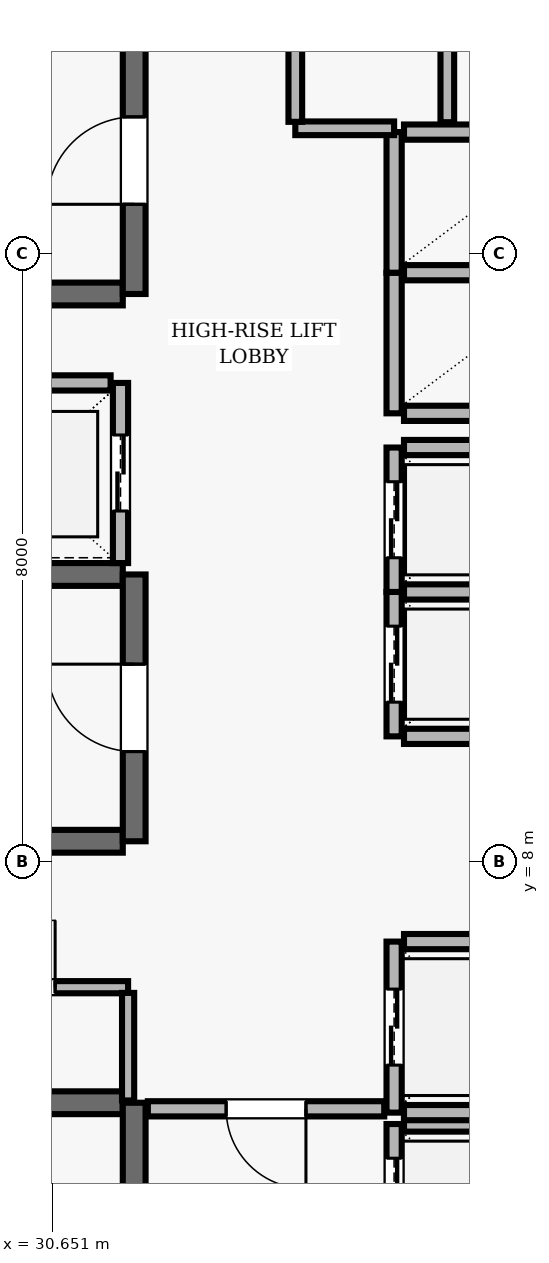
"""IFC4 building model, lengths in metres.
Left out: names, types, materials, properties, quantities, classifications, styles, units other than length and angle.
Written with IfcOpenShell. Run it as: python <this file> out.ifc"""

import sys

from ifc_helpers import new_model, si_unit, direction, frame, frame_2d, origin, place, context, subcontext, project, spatial, rectangle, extrude, element, fill, save


model = new_model("IFC4")
c1 = context("Model", 3, precision=1e-05, world=origin(), true_north=direction((0.0, 1.0)))
c2 = subcontext(c1, "Body", "Model", "MODEL_VIEW")
j1 = project(units=[si_unit("LENGTHUNIT", "METRE"), si_unit("PLANEANGLEUNIT", "RADIAN")], contexts=[c1])
p1 = place(None, origin())
s1 = spatial("IfcSite", under=j1, at=p1, CompositionType="ELEMENT")
p2 = place(p1, origin())
s2 = spatial("IfcBuilding", under=s1, at=p2, CompositionType="ELEMENT")
p3 = place(p2, frame((0.0, 0.0, 295.0)))
s3 = spatial("IfcBuildingStorey", under=s2, at=p3, CompositionType="ELEMENT", Elevation=295.0)
p4 = place(p3, frame((31.58, 4.83, 0.0), z_axis=(0.0, 0.0, 1.0), x_axis=(-1.0, 0.0, 0.0)))
e1 = element("IfcWall", 1, at=p4, inside=s3, PredefinedType="SHEAR", context=c2, shape_type="SweptSolid", body=[
    extrude(rectangle(XDim=8.36, YDim=0.3, at=frame_2d((4.18, 0.0))), origin(), (0.0, 0.0, 1.0), 3.69),
])
p5 = place(p3, frame((31.73, 0.96, 0.0), z_axis=(0.0, 0.0, 1.0), x_axis=(0.0, 1.0, 0.0)))
e2 = element("IfcWall", 2, at=p5, inside=s3, PredefinedType="SHEAR", context=c2, shape_type="SweptSolid", body=[
    extrude(rectangle(XDim=3.87, YDim=0.3, at=frame_2d((1.935, 0.0))), origin(), (0.0, 0.0, 1.0), 3.69),
])
p6 = place(p5, frame((1.54, 0.0, 0.0)))
e3 = element("IfcOpeningElement", 3, at=p6, cuts=e2, PredefinedType="OPENING", context=c2, shape_type="SweptSolid", body=[
    extrude(rectangle(XDim=1.15, YDim=2.15, at=frame_2d((0.575, 1.075))), frame((0.0, 0.16, 0.0), z_axis=(0.0, -1.0, 0.0), x_axis=(1.0, 0.0, 0.0)), (0.0, 0.0, 1.0), 0.32),
])
p7 = place(p3, frame((23.22, 15.47, 0.0), z_axis=(0.0, 0.0, 1.0), x_axis=(1.0, 0.0, 0.0)))
e4 = element("IfcWall", 4, at=p7, inside=s3, PredefinedType="SHEAR", context=c2, shape_type="SweptSolid", body=[
    extrude(rectangle(XDim=8.36, YDim=0.3, at=frame_2d((4.18, 0.0))), origin(), (0.0, 0.0, 1.0), 3.69),
])
p8 = place(p3, frame((31.73, 15.47, 0.0), z_axis=(0.0, 0.0, 1.0), x_axis=(0.0, 1.0, 0.0)))
e5 = element("IfcWall", 5, at=p8, inside=s3, PredefinedType="SHEAR", context=c2, shape_type="SweptSolid", body=[
    extrude(rectangle(XDim=3.51, YDim=0.3, at=frame_2d((1.755, 0.0))), origin(), (0.0, 0.0, 1.0), 3.69),
])
p9 = place(p8, frame((1.18, 0.0, 0.0)))
e6 = element("IfcOpeningElement", 6, at=p9, cuts=e5, PredefinedType="OPENING", context=c2, shape_type="SweptSolid", body=[
    extrude(rectangle(XDim=1.15, YDim=2.15, at=frame_2d((0.575, 1.075))), frame((0.0, 0.16, 0.0), z_axis=(0.0, -1.0, 0.0), x_axis=(1.0, 0.0, 0.0)), (0.0, 0.0, 1.0), 0.32),
])
for number, where, z_axis, x_axis in (
    (7, (31.58, 11.78, 0.0), (0.0, 0.0, 1.0), (-1.0, 0.0, 0.0)),
    (8, (23.22, 8.27, 0.0), (0.0, 0.0, 1.0), (1.0, 0.0, 0.0)),
):
    element("IfcWall", number, at=place(p3, frame(where, z_axis=z_axis, x_axis=x_axis)), inside=s3, PredefinedType="SHEAR", context=c2, shape_type="SweptSolid", body=[
        extrude(rectangle(XDim=8.36, YDim=0.3, at=frame_2d((4.18, 0.0))), origin(), (0.0, 0.0, 1.0), 3.69),
    ])
p10 = place(p3, frame((31.73, 8.27, 0.0), z_axis=(0.0, 0.0, 1.0), x_axis=(0.0, 1.0, 0.0)))
e9 = element("IfcWall", 9, at=p10, inside=s3, PredefinedType="SHEAR", context=c2, shape_type="SweptSolid", body=[
    extrude(rectangle(XDim=3.51, YDim=0.3, at=frame_2d((1.755, 0.0))), origin(), (0.0, 0.0, 1.0), 3.69),
])
p11 = place(p10, frame((1.18, 0.0, 0.0)))
e10 = element("IfcOpeningElement", 10, at=p11, cuts=e9, PredefinedType="OPENING", context=c2, shape_type="SweptSolid", body=[
    extrude(rectangle(XDim=1.15, YDim=2.15, at=frame_2d((0.575, 1.075))), frame((0.0, 0.16, 0.0), z_axis=(0.0, -1.0, 0.0), x_axis=(1.0, 0.0, 0.0)), (0.0, 0.0, 1.0), 0.32),
])
p12 = place(p3, frame((35.15, 4.55, 0.0), z_axis=(0.0, 0.0, 1.0), x_axis=(0.0, -1.0, 0.0)))
e11 = element("IfcWall", 11, at=p12, inside=s3, PredefinedType="SOLIDWALL", context=c2, shape_type="SweptSolid", body=[
    extrude(rectangle(XDim=2.1, YDim=0.2, at=frame_2d((1.05, 0.0))), origin(), (0.0, 0.0, 1.0), 3.69),
])
p13 = place(p12, frame((0.45, 0.0, 0.0)))
e12 = element("IfcOpeningElement", 12, at=p13, cuts=e11, PredefinedType="OPENING", context=c2, shape_type="SweptSolid", body=[
    extrude(rectangle(XDim=1.2, YDim=2.15, at=frame_2d((0.6, 1.075))), frame((0.0, 0.11, 0.0), z_axis=(0.0, -1.0, 0.0), x_axis=(1.0, 0.0, 0.0)), (0.0, 0.0, 1.0), 0.22),
])
p14 = place(p3, frame((37.42, 4.55, 0.0), z_axis=(0.0, 0.0, 1.0), x_axis=(-1.0, 0.0, 0.0)))
e13 = element("IfcWall", 13, at=p14, inside=s3, PredefinedType="SOLIDWALL", context=c2, shape_type="SweptSolid", body=[
    extrude(rectangle(XDim=2.14, YDim=0.2, at=frame_2d((1.07, 0.0))), origin(), (0.0, 0.0, 1.0), 3.69),
])
p15 = place(p3, frame((35.15, 6.95, 0.0), z_axis=(0.0, 0.0, 1.0), x_axis=(0.0, -1.0, 0.0)))
e14 = element("IfcWall", 14, at=p15, inside=s3, PredefinedType="SOLIDWALL", context=c2, shape_type="SweptSolid", body=[
    extrude(rectangle(XDim=2.25, YDim=0.2, at=frame_2d((1.125, 0.0))), origin(), (0.0, 0.0, 1.0), 3.69),
])
p16 = place(p15, frame((0.625, 0.0, 0.0)))
e15 = element("IfcOpeningElement", 15, at=p16, cuts=e14, PredefinedType="OPENING", context=c2, shape_type="SweptSolid", body=[
    extrude(rectangle(XDim=1.0, YDim=2.1, at=frame_2d((0.5, 1.05))), frame((0.0, 0.11, 0.0), z_axis=(0.0, -1.0, 0.0), x_axis=(1.0, 0.0, 0.0)), (0.0, 0.0, 1.0), 0.22),
])
for number, where, z_axis, x_axis in (
    (16, (35.28, 4.7, 0.0), (0.0, 0.0, 1.0), (1.0, 0.0, 0.0)),
    (17, (37.42, 6.95, 0.0), (0.0, 0.0, 1.0), (-1.0, 0.0, 0.0)),
):
    element("IfcWall", number, at=place(p3, frame(where, z_axis=z_axis, x_axis=x_axis)), inside=s3, PredefinedType="SOLIDWALL", context=c2, shape_type="SweptSolid", body=[
        extrude(rectangle(XDim=2.14, YDim=0.2, at=frame_2d((1.07, 0.0))), origin(), (0.0, 0.0, 1.0), 3.69),
    ])
p17 = place(p3, frame((35.15, 11.55, 0.0), z_axis=(0.0, 0.0, 1.0), x_axis=(0.0, -1.0, 0.0)))
e18 = element("IfcWall", 18, at=p17, inside=s3, PredefinedType="SOLIDWALL", context=c2, shape_type="SweptSolid", body=[
    extrude(rectangle(XDim=1.9, YDim=0.2, at=frame_2d((0.95, 0.0))), origin(), (0.0, 0.0, 1.0), 3.69),
])
p18 = place(p17, frame((0.45, 0.0, 0.0)))
e19 = element("IfcOpeningElement", 19, at=p18, cuts=e18, PredefinedType="OPENING", context=c2, shape_type="SweptSolid", body=[
    extrude(rectangle(XDim=1.0, YDim=2.1, at=frame_2d((0.5, 1.05))), frame((0.0, 0.11, 0.0), z_axis=(0.0, -1.0, 0.0), x_axis=(1.0, 0.0, 0.0)), (0.0, 0.0, 1.0), 0.22),
])
for number, where, z_axis, x_axis in (
    (20, (35.28, 9.65, 0.0), (0.0, 0.0, 1.0), (1.0, 0.0, 0.0)),
    (21, (37.42, 11.55, 0.0), (0.0, 0.0, 1.0), (-1.0, 0.0, 0.0)),
):
    element("IfcWall", number, at=place(p3, frame(where, z_axis=z_axis, x_axis=x_axis)), inside=s3, PredefinedType="SOLIDWALL", context=c2, shape_type="SweptSolid", body=[
        extrude(rectangle(XDim=2.14, YDim=0.2, at=frame_2d((1.07, 0.0))), origin(), (0.0, 0.0, 1.0), 3.69),
    ])
p19 = place(p3, frame((35.15, 13.45, 0.0), z_axis=(0.0, 0.0, 1.0), x_axis=(0.0, -1.0, 0.0)))
e22 = element("IfcWall", 22, at=p19, inside=s3, PredefinedType="SOLIDWALL", context=c2, shape_type="SweptSolid", body=[
    extrude(rectangle(XDim=1.9, YDim=0.2, at=frame_2d((0.95, 0.0))), origin(), (0.0, 0.0, 1.0), 3.69),
])
p20 = place(p19, frame((0.45, 0.0, 0.0)))
e23 = element("IfcOpeningElement", 23, at=p20, cuts=e22, PredefinedType="OPENING", context=c2, shape_type="SweptSolid", body=[
    extrude(rectangle(XDim=1.0, YDim=2.1, at=frame_2d((0.5, 1.05))), frame((0.0, 0.11, 0.0), z_axis=(0.0, -1.0, 0.0), x_axis=(1.0, 0.0, 0.0)), (0.0, 0.0, 1.0), 0.22),
])
p21 = place(p3, frame((37.42, 13.45, 0.0), z_axis=(0.0, 0.0, 1.0), x_axis=(-1.0, 0.0, 0.0)))
e24 = element("IfcWall", 24, at=p21, inside=s3, PredefinedType="SOLIDWALL", context=c2, shape_type="SweptSolid", body=[
    extrude(rectangle(XDim=2.14, YDim=0.2, at=frame_2d((1.07, 0.0))), origin(), (0.0, 0.0, 1.0), 3.69),
])
p22 = place(p3, frame((31.55, 11.93, 0.0), z_axis=(0.0, 0.0, 1.0), x_axis=(0.0, 1.0, 0.0)))
e25 = element("IfcWall", 25, at=p22, inside=s3, PredefinedType="SOLIDWALL", context=c2, shape_type="SweptSolid", body=[
    extrude(rectangle(XDim=2.37, YDim=0.2, at=frame_2d((1.185, 0.0))), origin(), (0.0, 0.0, 1.0), 3.69),
])
p23 = place(p22, frame((0.685, 0.0, 0.0)))
e26 = element("IfcOpeningElement", 26, at=p23, cuts=e25, PredefinedType="OPENING", context=c2, shape_type="SweptSolid", body=[
    extrude(rectangle(XDim=1.0, YDim=2.1, at=frame_2d((0.5, 1.05))), frame((0.0, 0.11, 0.0), z_axis=(0.0, -1.0, 0.0), x_axis=(1.0, 0.0, 0.0)), (0.0, 0.0, 1.0), 0.22),
])
p24 = place(p3, frame((31.42, 14.3, 0.0), z_axis=(0.0, 0.0, 1.0), x_axis=(-1.0, 0.0, 0.0)))
e27 = element("IfcWall", 27, at=p24, inside=s3, PredefinedType="SOLIDWALL", context=c2, shape_type="SweptSolid", body=[
    extrude(rectangle(XDim=2.44, YDim=0.2, at=frame_2d((1.22, 0.0))), origin(), (0.0, 0.0, 1.0), 3.69),
])
p25 = place(p3, frame((35.15, 15.75, 0.0), z_axis=(0.0, 0.0, 1.0), x_axis=(0.0, -1.0, 0.0)))
e28 = element("IfcWall", 28, at=p25, inside=s3, PredefinedType="SOLIDWALL", context=c2, shape_type="SweptSolid", body=[
    extrude(rectangle(XDim=1.85, YDim=0.2, at=frame_2d((0.925, 0.0))), origin(), (0.0, 0.0, 1.0), 3.69),
])
for number, where, z_axis, x_axis in (
    (29, (35.28, 13.9, 0.0), (0.0, 0.0, 1.0), (1.0, 0.0, 0.0)),
    (30, (37.42, 15.75, 0.0), (0.0, 0.0, 1.0), (-1.0, 0.0, 0.0)),
):
    element("IfcWall", number, at=place(p3, frame(where, z_axis=z_axis, x_axis=x_axis)), inside=s3, PredefinedType="SOLIDWALL", context=c2, shape_type="SweptSolid", body=[
        extrude(rectangle(XDim=2.14, YDim=0.2, at=frame_2d((1.07, 0.0))), origin(), (0.0, 0.0, 1.0), 3.69),
    ])
p26 = place(p3, frame((35.15, 17.6, 0.0), z_axis=(0.0, 0.0, 1.0), x_axis=(0.0, -1.0, 0.0)))
e31 = element("IfcWall", 31, at=p26, inside=s3, PredefinedType="SOLIDWALL", context=c2, shape_type="SweptSolid", body=[
    extrude(rectangle(XDim=1.85, YDim=0.2, at=frame_2d((0.925, 0.0))), origin(), (0.0, 0.0, 1.0), 3.69),
])
p27 = place(p3, frame((37.42, 17.6, 0.0), z_axis=(0.0, 0.0, 1.0), x_axis=(-1.0, 0.0, 0.0)))
e32 = element("IfcWall", 32, at=p27, inside=s3, PredefinedType="SOLIDWALL", context=c2, shape_type="SweptSolid", body=[
    extrude(rectangle(XDim=2.14, YDim=0.2, at=frame_2d((1.07, 0.0))), origin(), (0.0, 0.0, 1.0), 3.69),
])
p28 = place(p3, frame((28.85, 6.35, 0.0), z_axis=(0.0, 0.0, 1.0), x_axis=(1.0, 0.0, 0.0)))
e33 = element("IfcWall", 33, at=p28, inside=s3, PredefinedType="PARTITIONING", context=c2, shape_type="SweptSolid", body=[
    extrude(rectangle(XDim=2.8, YDim=0.16, at=frame_2d((1.4, 0.0))), origin(), (0.0, 0.0, 1.0), 3.69),
])
p29 = place(p28, frame((0.96, 0.0, 0.0)))
e34 = element("IfcOpeningElement", 34, at=p29, cuts=e33, PredefinedType="OPENING", context=c2, shape_type="SweptSolid", body=[
    extrude(rectangle(XDim=0.88, YDim=2.1, at=frame_2d((0.44, 1.05))), frame((0.0, 0.09, 0.0), z_axis=(0.0, -1.0, 0.0), x_axis=(1.0, 0.0, 0.0)), (0.0, 0.0, 1.0), 0.18),
])
p30 = place(p3, frame((33.85, 17.65, 0.0), z_axis=(0.0, 0.0, 1.0), x_axis=(1.0, 0.0, 0.0)))
e35 = element("IfcWall", 35, at=p30, inside=s3, PredefinedType="PARTITIONING", context=c2, shape_type="SweptSolid", body=[
    extrude(rectangle(XDim=1.3, YDim=0.18, at=frame_2d((0.65, 0.0))), origin(), (0.0, 0.0, 1.0), 3.69),
])
p31 = place(p3, frame((35.02, 4.75, 0.0), z_axis=(0.0, 0.0, 1.0), x_axis=(-1.0, 0.0, 0.0)))
e36 = element("IfcWall", 36, at=p31, inside=s3, PredefinedType="SOLIDWALL", context=c2, shape_type="SweptSolid", body=[
    extrude(rectangle(XDim=3.11, YDim=0.2, at=frame_2d((1.555, 0.0))), origin(), (0.0, 0.0, 1.0), 3.69),
])
p32 = place(p31, frame((1.03, 0.0, 0.0)))
e37 = element("IfcOpeningElement", 37, at=p32, cuts=e36, PredefinedType="OPENING", context=c2, shape_type="SweptSolid", body=[
    extrude(rectangle(XDim=1.05, YDim=2.15, at=frame_2d((0.525, 1.075))), frame((0.0, 0.11, 0.0), z_axis=(0.0, -1.0, 0.0), x_axis=(1.0, 0.0, 0.0)), (0.0, 0.0, 1.0), 0.22),
])
p33 = place(p3, frame((31.65, 4.86, 0.0), z_axis=(0.0, 0.0, 1.0), x_axis=(0.0, 1.0, 0.0)))
e38 = element("IfcWall", 38, at=p33, inside=s3, PredefinedType="PARTITIONING", context=c2, shape_type="SweptSolid", body=[
    extrude(rectangle(XDim=1.415, YDim=0.16, at=frame_2d((0.708, 0.0))), origin(), (0.0, 0.0, 1.0), 3.69),
])
p34 = place(p3, frame((33.85, 17.735, 0.0), z_axis=(0.0, 0.0, 1.0), x_axis=(0.0, 1.0, 0.0)))
e39 = element("IfcWall", 39, at=p34, inside=s3, PredefinedType="PARTITIONING", context=c2, shape_type="SweptSolid", body=[
    extrude(rectangle(XDim=6.03, YDim=0.18, at=frame_2d((3.015, 0.0))), origin(), (0.0, 0.0, 1.0), 3.69),
])
p35 = place(p34, frame((2.54, 0.0, 0.0)))
e40 = element("IfcOpeningElement", 40, at=p35, cuts=e39, PredefinedType="OPENING", context=c2, shape_type="SweptSolid", body=[
    extrude(rectangle(XDim=0.95, YDim=2.1, at=frame_2d((0.475, 1.05))), frame((0.0, 0.1, 0.0), z_axis=(0.0, -1.0, 0.0), x_axis=(1.0, 0.0, 0.0)), (0.0, 0.0, 1.0), 0.2),
])
p36 = place(p3, frame((35.85, 17.73, 0.0), z_axis=(0.0, 0.0, 1.0), x_axis=(0.0, 1.0, 0.0)))
e41 = element("IfcWall", 41, at=p36, inside=s3, PredefinedType="PARTITIONING", context=c2, shape_type="SweptSolid", body=[
    extrude(rectangle(XDim=3.412, YDim=0.18, at=frame_2d((1.706, 0.0))), origin(), (0.0, 0.0, 1.0), 3.69),
])
p37 = place(p36, frame((1.256, 0.0, 0.0)))
e42 = element("IfcOpeningElement", 42, at=p37, cuts=e41, PredefinedType="OPENING", context=c2, shape_type="SweptSolid", body=[
    extrude(rectangle(XDim=0.9, YDim=2.1, at=frame_2d((0.45, 1.05))), frame((0.0, 0.1, 0.0), z_axis=(0.0, -1.0, 0.0), x_axis=(1.0, 0.0, 0.0)), (0.0, 0.0, 1.0), 0.2),
])
p38 = place(p9, origin())
e43 = element("IfcDoor", 43, at=p38, inside=s3, OperationType="SINGLE_SWING_LEFT", PredefinedType="DOOR", context=c2, shape_type="SweptSolid", body=[
    extrude(rectangle(XDim=1.15, YDim=2.15, at=frame_2d((0.575, 1.075))), frame((0.0, 0.025, 0.0), z_axis=(0.0, -1.0, 0.0), x_axis=(1.0, 0.0, 0.0)), (0.0, 0.0, 1.0), 0.05),
])
fill(e6, e43)
p39 = place(p11, origin())
e44 = element("IfcDoor", 44, at=p39, inside=s3, OperationType="SINGLE_SWING_RIGHT", PredefinedType="DOOR", context=c2, shape_type="SweptSolid", body=[
    extrude(rectangle(XDim=1.15, YDim=2.15, at=frame_2d((0.575, 1.075))), frame((0.0, 0.025, 0.0), z_axis=(0.0, -1.0, 0.0), x_axis=(1.0, 0.0, 0.0)), (0.0, 0.0, 1.0), 0.05),
])
fill(e10, e44)
p40 = place(p13, origin())
e45 = element("IfcDoor", 45, at=p40, inside=s3, OperationType="DOUBLE_DOOR_SLIDING", PredefinedType="DOOR", context=c2, shape_type="SweptSolid", body=[
    extrude(rectangle(XDim=1.2, YDim=2.15, at=frame_2d((0.6, 1.075))), frame((0.0, 0.025, 0.0), z_axis=(0.0, -1.0, 0.0), x_axis=(1.0, 0.0, 0.0)), (0.0, 0.0, 1.0), 0.05),
])
fill(e12, e45)
p41 = place(p16, origin())
e46 = element("IfcDoor", 46, at=p41, inside=s3, OperationType="DOUBLE_DOOR_SLIDING", PredefinedType="DOOR", context=c2, shape_type="SweptSolid", body=[
    extrude(rectangle(XDim=1.0, YDim=2.1, at=frame_2d((0.5, 1.05))), frame((0.0, 0.025, 0.0), z_axis=(0.0, -1.0, 0.0), x_axis=(1.0, 0.0, 0.0)), (0.0, 0.0, 1.0), 0.05),
])
fill(e15, e46)
p42 = place(p18, origin())
e47 = element("IfcDoor", 47, at=p42, inside=s3, OperationType="DOUBLE_DOOR_SLIDING", PredefinedType="DOOR", context=c2, shape_type="SweptSolid", body=[
    extrude(rectangle(XDim=1.0, YDim=2.1, at=frame_2d((0.5, 1.05))), frame((0.0, 0.025, 0.0), z_axis=(0.0, -1.0, 0.0), x_axis=(1.0, 0.0, 0.0)), (0.0, 0.0, 1.0), 0.05),
])
fill(e19, e47)
p43 = place(p20, origin())
e48 = element("IfcDoor", 48, at=p43, inside=s3, OperationType="DOUBLE_DOOR_SLIDING", PredefinedType="DOOR", context=c2, shape_type="SweptSolid", body=[
    extrude(rectangle(XDim=1.0, YDim=2.1, at=frame_2d((0.5, 1.05))), frame((0.0, 0.025, 0.0), z_axis=(0.0, -1.0, 0.0), x_axis=(1.0, 0.0, 0.0)), (0.0, 0.0, 1.0), 0.05),
])
fill(e23, e48)
p44 = place(p23, origin())
e49 = element("IfcDoor", 49, at=p44, inside=s3, OperationType="DOUBLE_DOOR_SLIDING", PredefinedType="DOOR", context=c2, shape_type="SweptSolid", body=[
    extrude(rectangle(XDim=1.0, YDim=2.1, at=frame_2d((0.5, 1.05))), frame((0.0, 0.025, 0.0), z_axis=(0.0, -1.0, 0.0), x_axis=(1.0, 0.0, 0.0)), (0.0, 0.0, 1.0), 0.05),
])
fill(e26, e49)
p45 = place(p32, origin())
e50 = element("IfcDoor", 50, at=p45, inside=s3, OperationType="SINGLE_SWING_LEFT", PredefinedType="DOOR", context=c2, shape_type="SweptSolid", body=[
    extrude(rectangle(XDim=1.05, YDim=2.15, at=frame_2d((0.525, 1.075))), frame((0.0, 0.025, 0.0), z_axis=(0.0, -1.0, 0.0), x_axis=(1.0, 0.0, 0.0)), (0.0, 0.0, 1.0), 0.05),
])
fill(e37, e50)
p46 = place(p29, origin())
e51 = element("IfcDoor", 51, at=p46, inside=s3, OperationType="SINGLE_SWING_RIGHT", PredefinedType="DOOR", context=c2, shape_type="SweptSolid", body=[
    extrude(rectangle(XDim=0.88, YDim=2.1, at=frame_2d((0.44, 1.05))), frame((0.0, 0.025, 0.0), z_axis=(0.0, -1.0, 0.0), x_axis=(1.0, 0.0, 0.0)), (0.0, 0.0, 1.0), 0.05),
])
fill(e34, e51)
save(model, sys.argv[1])
